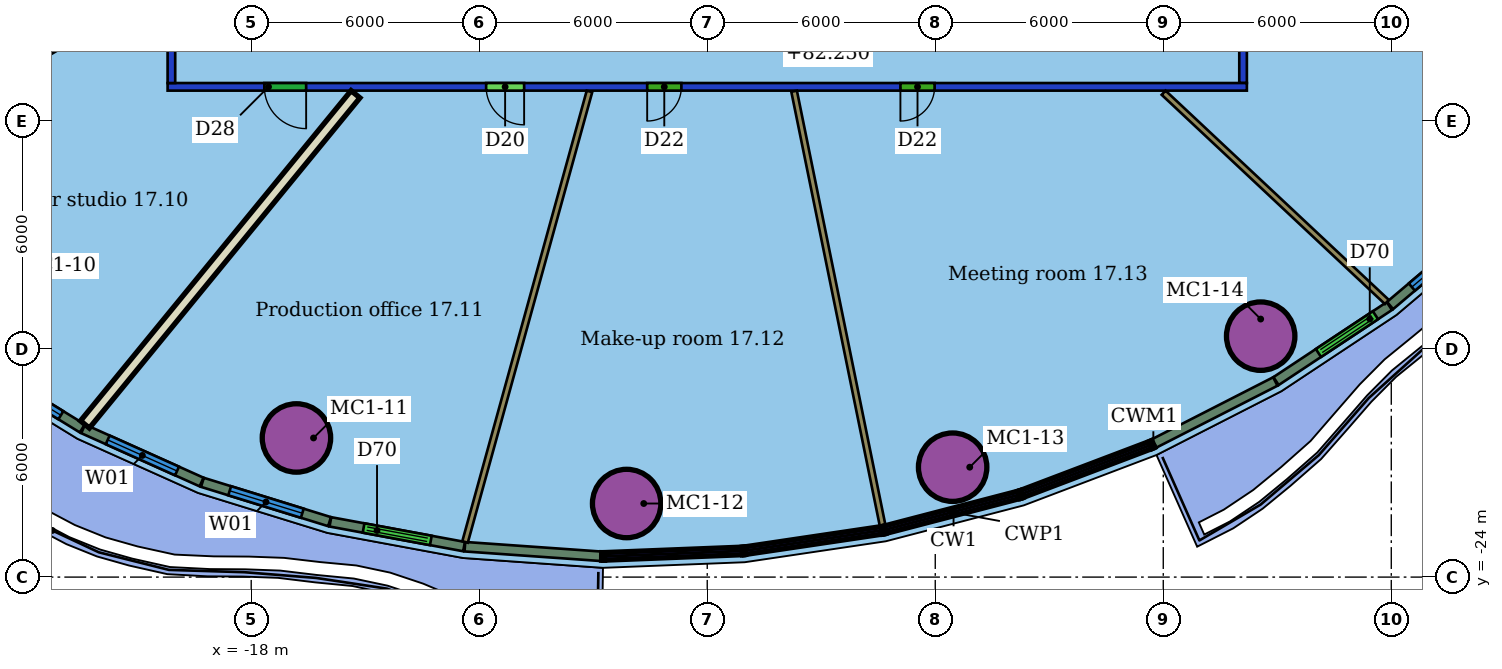
"""IFC4 building model, lengths in metres.
Left out: names, types, materials, properties, quantities, classifications, styles, units other than length and angle.
Written with IfcOpenShell. Run it as: python <this file> out.ifc"""

import sys

from ifc_helpers import new_model, si_unit, direction, frame, frame_2d, origin, origin_2d, place, context, subcontext, project, spatial, rectangle, hollow_circle, extrude, element, fill, save


model = new_model("IFC4")
c1 = context("Model", 3, precision=1e-05, world=origin(), true_north=direction((0.0, 1.0)))
c2 = subcontext(c1, "Body", "Model", "MODEL_VIEW")
j1 = project(units=[si_unit("LENGTHUNIT", "METRE"), si_unit("PLANEANGLEUNIT", "RADIAN")], contexts=[c1])
p1 = place(None, origin())
s1 = spatial("IfcSite", under=j1, at=p1, CompositionType="ELEMENT")
p2 = place(p1, origin())
s2 = spatial("IfcBuilding", under=s1, at=p2, CompositionType="ELEMENT")
p3 = place(p2, frame((0.0, 0.0, 80.4)))
s3 = spatial("IfcBuildingStorey", under=s2, at=p3, CompositionType="ELEMENT", Elevation=80.4)
for number, where, z_axis, x_axis in (
    (1, (-16.81, -20.339, 0.0), (0.0, 0.0, 1.0), (1.0, 0.0, 0.0)),
    (2, (-8.121, -22.064, 0.0), (0.0, 0.0, 1.0), (1.0, 0.0, 0.0)),
    (3, (0.458, -21.108, 0.0), (0.0, 0.0, 1.0), (1.0, 0.0, 0.0)),
    (4, (8.563, -17.66, 0.0), (0.0, 0.0, 1.0), (1.0, 0.0, 0.0)),
):
    element("IfcColumn", number, at=place(p3, frame(where, z_axis=z_axis, x_axis=x_axis)), inside=s3, PredefinedType="COLUMN", context=c2, shape_type="SweptSolid", body=[
        extrude(hollow_circle(Radius=0.9, WallThickness=0.06, at=origin_2d()), origin(), (0.0, 0.0, 1.0), 3.5),
    ])
p4 = place(p3, frame((8.2, -11.1, 0.0), z_axis=(0.0, 0.0, 1.0), x_axis=(-1.0, 0.0, 0.0)))
e5 = element("IfcWall", 5, at=p4, inside=s3, PredefinedType="PARTITIONING", context=c2, shape_type="SweptSolid", body=[
    extrude(rectangle(XDim=28.4, YDim=0.2, at=frame_2d((14.2, 0.0))), origin(), (0.0, 0.0, 1.0), 2.8),
])
p5 = place(p4, frame((24.754, 0.0, 0.0)))
e6 = element("IfcOpeningElement", 6, at=p5, cuts=e5, PredefinedType="OPENING", context=c2, shape_type="SweptSolid", body=[
    extrude(rectangle(XDim=1.1, YDim=2.1, at=frame_2d((0.55, 1.05))), frame((0.0, 0.11, 0.0), z_axis=(0.0, -1.0, 0.0), x_axis=(1.0, 0.0, 0.0)), (0.0, 0.0, 1.0), 0.22),
])
p6 = place(p4, frame((19.019, 0.0, 0.0)))
e7 = element("IfcOpeningElement", 7, at=p6, cuts=e5, PredefinedType="OPENING", context=c2, shape_type="SweptSolid", body=[
    extrude(rectangle(XDim=1.0, YDim=2.1, at=frame_2d((0.5, 1.05))), frame((0.0, 0.11, 0.0), z_axis=(0.0, -1.0, 0.0), x_axis=(1.0, 0.0, 0.0)), (0.0, 0.0, 1.0), 0.22),
])
p7 = place(p4, frame((14.88, 0.0, 0.0)))
e8 = element("IfcOpeningElement", 8, at=p7, cuts=e5, PredefinedType="OPENING", context=c2, shape_type="SweptSolid", body=[
    extrude(rectangle(XDim=0.9, YDim=2.1, at=frame_2d((0.45, 1.05))), frame((0.0, 0.11, 0.0), z_axis=(0.0, -1.0, 0.0), x_axis=(1.0, 0.0, 0.0)), (0.0, 0.0, 1.0), 0.22),
])
p8 = place(p4, frame((8.217, 0.0, 0.0)))
e9 = element("IfcOpeningElement", 9, at=p8, cuts=e5, PredefinedType="OPENING", context=c2, shape_type="SweptSolid", body=[
    extrude(rectangle(XDim=0.9, YDim=2.1, at=frame_2d((0.45, 1.05))), frame((0.0, 0.11, 0.0), z_axis=(0.0, -1.0, 0.0), x_axis=(1.0, 0.0, 0.0)), (0.0, 0.0, 1.0), 0.22),
])
p9 = place(p3, frame((-20.1, -11.0, 0.0), z_axis=(0.0, 0.0, 1.0), x_axis=(0.0, 1.0, 0.0)))
e10 = element("IfcWall", 10, at=p9, inside=s3, PredefinedType="PARTITIONING", context=c2, shape_type="SweptSolid", body=[
    extrude(rectangle(XDim=22.0, YDim=0.2, at=frame_2d((11.0, 0.0))), origin(), (0.0, 0.0, 1.0), 2.8),
])
p10 = place(p9, frame((18.0, 0.0, 0.0)))
e11 = element("IfcOpeningElement", 11, at=p10, cuts=e10, PredefinedType="OPENING", context=c2, shape_type="SweptSolid", body=[
    extrude(rectangle(XDim=0.9, YDim=2.1, at=frame_2d((0.45, 1.05))), frame((0.0, 0.11, 0.0), z_axis=(0.0, -1.0, 0.0), x_axis=(1.0, 0.0, 0.0)), (0.0, 0.0, 1.0), 0.22),
])
p11 = place(p9, frame((13.798, 0.0, 0.0)))
e12 = element("IfcOpeningElement", 12, at=p11, cuts=e10, PredefinedType="OPENING", context=c2, shape_type="SweptSolid", body=[
    extrude(rectangle(XDim=1.1, YDim=2.1, at=frame_2d((0.55, 1.05))), frame((0.0, 0.11, 0.0), z_axis=(0.0, -1.0, 0.0), x_axis=(1.0, 0.0, 0.0)), (0.0, 0.0, 1.0), 0.22),
])
p12 = place(p9, frame((8.872, 0.0, 0.0)))
e13 = element("IfcOpeningElement", 13, at=p12, cuts=e10, PredefinedType="OPENING", context=c2, shape_type="SweptSolid", body=[
    extrude(rectangle(XDim=1.2, YDim=2.1, at=frame_2d((0.6, 1.05))), frame((0.0, 0.11, 0.0), z_axis=(0.0, -1.0, 0.0), x_axis=(1.0, 0.0, 0.0)), (0.0, 0.0, 1.0), 0.22),
])
p13 = place(p9, frame((5.6, 0.0, 0.0)))
e14 = element("IfcOpeningElement", 14, at=p13, cuts=e10, PredefinedType="OPENING", context=c2, shape_type="SweptSolid", body=[
    extrude(rectangle(XDim=1.0, YDim=2.1, at=frame_2d((0.5, 1.05))), frame((0.0, 0.11, 0.0), z_axis=(0.0, -1.0, 0.0), x_axis=(1.0, 0.0, 0.0)), (0.0, 0.0, 1.0), 0.22),
])
p14 = place(p3, frame((8.1, 11.0, 0.0), z_axis=(0.0, 0.0, 1.0), x_axis=(0.0, -1.0, 0.0)))
e15 = element("IfcWall", 15, at=p14, inside=s3, PredefinedType="PARTITIONING", context=c2, shape_type="SweptSolid", body=[
    extrude(rectangle(XDim=22.0, YDim=0.2, at=frame_2d((11.0, 0.0))), origin(), (0.0, 0.0, 1.0), 2.8),
])
p15 = place(p14, frame((5.63, 0.0, 0.0)))
e16 = element("IfcOpeningElement", 16, at=p15, cuts=e15, PredefinedType="OPENING", context=c2, shape_type="SweptSolid", body=[
    extrude(rectangle(XDim=1.0, YDim=2.1, at=frame_2d((0.5, 1.05))), frame((0.0, 0.11, 0.0), z_axis=(0.0, -1.0, 0.0), x_axis=(1.0, 0.0, 0.0)), (0.0, 0.0, 1.0), 0.22),
])
p16 = place(p14, frame((16.523, 0.0, 0.0)))
e17 = element("IfcOpeningElement", 17, at=p16, cuts=e15, PredefinedType="OPENING", context=c2, shape_type="SweptSolid", body=[
    extrude(rectangle(XDim=1.5, YDim=2.1, at=frame_2d((0.75, 1.05))), frame((0.0, 0.11, 0.0), z_axis=(0.0, -1.0, 0.0), x_axis=(1.0, 0.0, 0.0)), (0.0, 0.0, 1.0), 0.22),
])
p17 = place(p14, frame((12.501, 0.0, 0.0)))
e18 = element("IfcOpeningElement", 18, at=p17, cuts=e15, PredefinedType="OPENING", context=c2, shape_type="SweptSolid", body=[
    extrude(rectangle(XDim=1.1, YDim=2.1, at=frame_2d((0.55, 1.05))), frame((0.0, 0.11, 0.0), z_axis=(0.0, -1.0, 0.0), x_axis=(1.0, 0.0, 0.0)), (0.0, 0.0, 1.0), 0.22),
])
p18 = place(p14, frame((8.782, 0.0, 0.0)))
e19 = element("IfcOpeningElement", 19, at=p18, cuts=e15, PredefinedType="OPENING", context=c2, shape_type="SweptSolid", body=[
    extrude(rectangle(XDim=1.5, YDim=2.1, at=frame_2d((0.75, 1.05))), frame((0.0, 0.11, 0.0), z_axis=(0.0, -1.0, 0.0), x_axis=(1.0, 0.0, 0.0)), (0.0, 0.0, 1.0), 0.22),
])
p19 = place(p3, frame((-29.864, -13.859, 0.0), z_axis=(0.0, 0.0, 1.0), x_axis=(0.864754710569, 0.502194474829, 0.0)))
e20 = element("IfcWall", 20, at=p19, inside=s3, PredefinedType="PARTITIONING", context=c2, shape_type="SweptSolid", body=[
    extrude(rectangle(XDim=11.089, YDim=0.3, at=frame_2d((5.544, 0.0))), origin(), (0.0, 0.0, 1.0), 3.5),
])
p20 = place(p3, frame((-22.375, -19.983, 0.0), z_axis=(0.0, 0.0, 1.0), x_axis=(0.633828209526, 0.773473852699, 0.0)))
e21 = element("IfcWall", 21, at=p20, inside=s3, PredefinedType="PARTITIONING", context=c2, shape_type="SweptSolid", body=[
    extrude(rectangle(XDim=11.233, YDim=0.3, at=frame_2d((5.616, 0.0))), origin(), (0.0, 0.0, 1.0), 3.5),
])
p21 = place(p3, frame((-12.373, -23.075, 0.0), z_axis=(0.0, 0.0, 1.0), x_axis=(0.266208224794, 0.963915546639, 0.0)))
e22 = element("IfcWall", 22, at=p21, inside=s3, PredefinedType="PARTITIONING", context=c2, shape_type="SweptSolid", body=[
    extrude(rectangle(XDim=12.299, YDim=0.15, at=frame_2d((6.15, 0.0))), origin(), (0.0, 0.0, 1.0), 3.5),
])
p22 = place(p3, frame((-1.385, -22.641, 0.0), z_axis=(0.0, 0.0, 1.0), x_axis=(-0.199694198183, 0.979858268941, 0.0)))
e23 = element("IfcWall", 23, at=p22, inside=s3, PredefinedType="PARTITIONING", context=c2, shape_type="SweptSolid", body=[
    extrude(rectangle(XDim=11.661, YDim=0.15, at=frame_2d((5.831, 0.0))), origin(), (0.0, 0.0, 1.0), 3.5),
])
p23 = place(p3, frame((11.884, -16.761, 0.0), z_axis=(0.0, 0.0, 1.0), x_axis=(-0.729643098054, 0.683828157846, 0.0)))
e24 = element("IfcWall", 24, at=p23, inside=s3, PredefinedType="PARTITIONING", context=c2, shape_type="SweptSolid", body=[
    extrude(rectangle(XDim=8.052, YDim=0.15, at=frame_2d((4.026, 0.0))), origin(), (0.0, 0.0, 1.0), 3.5),
])
p24 = place(p3, frame((-25.278, -18.348, 0.0), z_axis=(0.0, 0.0, 1.0), x_axis=(0.85230041537, -0.523052580492, 0.0)))
e25 = element("IfcWall", 25, at=p24, inside=s3, PredefinedType="SOLIDWALL", context=c2, shape_type="SweptSolid", body=[
    extrude(rectangle(XDim=3.326, YDim=0.25, at=frame_2d((1.663, 0.0))), origin(), (0.0, 0.0, 1.0), 3.1),
])
p25 = place(p24, frame((0.663, 0.0, 0.8)))
e26 = element("IfcOpeningElement", 26, at=p25, cuts=e25, PredefinedType="OPENING", context=c2, shape_type="SweptSolid", body=[
    extrude(rectangle(XDim=2.0, YDim=2.2, at=frame_2d((1.0, 1.1))), frame((0.0, 0.135, 0.0), z_axis=(0.0, -1.0, 0.0), x_axis=(1.0, 0.0, 0.0)), (0.0, 0.0, 1.0), 0.27),
])
p26 = place(p3, frame((-22.423, -20.099, 0.0), z_axis=(0.0, 0.0, 1.0), x_axis=(0.912234110734, -0.409669290055, 0.0)))
e27 = element("IfcWall", 27, at=p26, inside=s3, PredefinedType="SOLIDWALL", context=c2, shape_type="SweptSolid", body=[
    extrude(rectangle(XDim=3.417, YDim=0.25, at=frame_2d((1.708, 0.0))), origin(), (0.0, 0.0, 1.0), 3.1),
])
p27 = place(p26, frame((0.708, 0.0, 0.8)))
e28 = element("IfcOpeningElement", 28, at=p27, cuts=e27, PredefinedType="OPENING", context=c2, shape_type="SweptSolid", body=[
    extrude(rectangle(XDim=2.0, YDim=2.2, at=frame_2d((1.0, 1.1))), frame((0.0, 0.135, 0.0), z_axis=(0.0, -1.0, 0.0), x_axis=(1.0, 0.0, 0.0)), (0.0, 0.0, 1.0), 0.27),
])
p28 = place(p3, frame((-19.284, -21.507, 0.0), z_axis=(0.0, 0.0, 1.0), x_axis=(0.955359001532, -0.295447420351, 0.0)))
e29 = element("IfcWall", 29, at=p28, inside=s3, PredefinedType="SOLIDWALL", context=c2, shape_type="SweptSolid", body=[
    extrude(rectangle(XDim=3.502, YDim=0.25, at=frame_2d((1.751, 0.0))), origin(), (0.0, 0.0, 1.0), 3.1),
])
p29 = place(p28, frame((0.751, 0.0, 0.8)))
e30 = element("IfcOpeningElement", 30, at=p29, cuts=e29, PredefinedType="OPENING", context=c2, shape_type="SweptSolid", body=[
    extrude(rectangle(XDim=2.0, YDim=2.2, at=frame_2d((1.0, 1.1))), frame((0.0, 0.135, 0.0), z_axis=(0.0, -1.0, 0.0), x_axis=(1.0, 0.0, 0.0)), (0.0, 0.0, 1.0), 0.27),
])
p30 = place(p3, frame((-15.917, -22.547, 0.0), z_axis=(0.0, 0.0, 1.0), x_axis=(0.983303724205, -0.181971937299, 0.0)))
e31 = element("IfcWall", 31, at=p30, inside=s3, PredefinedType="SOLIDWALL", context=c2, shape_type="SweptSolid", body=[
    extrude(rectangle(XDim=3.577, YDim=0.25, at=frame_2d((1.789, 0.0))), origin(), (0.0, 0.0, 1.0), 3.1),
])
p31 = place(p30, frame((0.888, 0.0, 0.0)))
e32 = element("IfcOpeningElement", 32, at=p31, cuts=e31, PredefinedType="OPENING", context=c2, shape_type="SweptSolid", body=[
    extrude(rectangle(XDim=1.8, YDim=2.4, at=frame_2d((0.9, 1.2))), frame((0.0, 0.135, 0.0), z_axis=(0.0, -1.0, 0.0), x_axis=(1.0, 0.0, 0.0)), (0.0, 0.0, 1.0), 0.27),
])
p32 = place(p3, frame((-12.377, -23.2, 0.0), z_axis=(0.0, 0.0, 1.0), x_axis=(0.997533004905, -0.070199032227, 0.0)))
e33 = element("IfcWall", 33, at=p32, inside=s3, PredefinedType="SOLIDWALL", context=c2, shape_type="SweptSolid", body=[
    extrude(rectangle(XDim=3.593, YDim=0.25, at=frame_2d((1.796, 0.0))), origin(), (0.0, 0.0, 1.0), 3.1),
])
p33 = place(p3, frame((5.75, -20.488, 0.0), z_axis=(0.0, 0.0, 1.0), x_axis=(0.890478739506, 0.455024850407, 0.0)))
e34 = element("IfcWall", 34, at=p33, inside=s3, PredefinedType="SOLIDWALL", context=c2, shape_type="SweptSolid", body=[
    extrude(rectangle(XDim=3.593, YDim=0.25, at=frame_2d((1.796, 0.0))), origin(), (0.0, 0.0, 1.0), 3.1),
])
p34 = place(p3, frame((8.968, -18.843, 0.0), z_axis=(0.0, 0.0, 1.0), x_axis=(0.833653527953, 0.552287783073, 0.0)))
e35 = element("IfcWall", 35, at=p34, inside=s3, PredefinedType="SOLIDWALL", context=c2, shape_type="SweptSolid", body=[
    extrude(rectangle(XDim=3.577, YDim=0.25, at=frame_2d((1.788, 0.0))), origin(), (0.0, 0.0, 1.0), 3.1),
])
p35 = place(p34, frame((1.338, 0.0, 0.0)))
e36 = element("IfcOpeningElement", 36, at=p35, cuts=e35, PredefinedType="OPENING", context=c2, shape_type="SweptSolid", body=[
    extrude(rectangle(XDim=1.8, YDim=2.4, at=frame_2d((0.9, 1.2))), frame((0.0, 0.135, 0.0), z_axis=(0.0, -1.0, 0.0), x_axis=(1.0, 0.0, 0.0)), (0.0, 0.0, 1.0), 0.27),
])
p36 = place(p3, frame((11.968, -16.854, 0.0), z_axis=(0.0, 0.0, 1.0), x_axis=(0.76352642001, 0.645776591358, 0.0)))
e37 = element("IfcWall", 37, at=p36, inside=s3, PredefinedType="SOLIDWALL", context=c2, shape_type="SweptSolid", body=[
    extrude(rectangle(XDim=3.502, YDim=0.25, at=frame_2d((1.751, 0.0))), origin(), (0.0, 0.0, 1.0), 3.1),
])
p37 = place(p36, frame((0.751, 0.0, 0.8)))
e38 = element("IfcOpeningElement", 38, at=p37, cuts=e37, PredefinedType="OPENING", context=c2, shape_type="SweptSolid", body=[
    extrude(rectangle(XDim=2.0, YDim=2.2, at=frame_2d((1.0, 1.1))), frame((0.0, 0.135, 0.0), z_axis=(0.0, -1.0, 0.0), x_axis=(1.0, 0.0, 0.0)), (0.0, 0.0, 1.0), 0.27),
])
p38 = place(p5, origin())
e39 = element("IfcDoor", 39, at=p38, inside=s3, OperationType="SINGLE_SWING_LEFT", PredefinedType="DOOR", context=c2, shape_type="SweptSolid", body=[
    extrude(rectangle(XDim=1.1, YDim=2.1, at=frame_2d((0.55, 1.05))), frame((0.0, 0.025, 0.0), z_axis=(0.0, -1.0, 0.0), x_axis=(1.0, 0.0, 0.0)), (0.0, 0.0, 1.0), 0.05),
])
fill(e6, e39)
p39 = place(p6, origin())
e40 = element("IfcDoor", 40, at=p39, inside=s3, OperationType="SINGLE_SWING_LEFT", PredefinedType="DOOR", context=c2, shape_type="SweptSolid", body=[
    extrude(rectangle(XDim=1.0, YDim=2.1, at=frame_2d((0.5, 1.05))), frame((0.0, 0.025, 0.0), z_axis=(0.0, -1.0, 0.0), x_axis=(1.0, 0.0, 0.0)), (0.0, 0.0, 1.0), 0.05),
])
fill(e7, e40)
p40 = place(p7, origin())
e41 = element("IfcDoor", 41, at=p40, inside=s3, OperationType="SINGLE_SWING_RIGHT", PredefinedType="DOOR", context=c2, shape_type="SweptSolid", body=[
    extrude(rectangle(XDim=0.9, YDim=2.1, at=frame_2d((0.45, 1.05))), frame((0.0, 0.025, 0.0), z_axis=(0.0, -1.0, 0.0), x_axis=(1.0, 0.0, 0.0)), (0.0, 0.0, 1.0), 0.05),
])
fill(e8, e41)
p41 = place(p8, origin())
e42 = element("IfcDoor", 42, at=p41, inside=s3, OperationType="SINGLE_SWING_RIGHT", PredefinedType="DOOR", context=c2, shape_type="SweptSolid", body=[
    extrude(rectangle(XDim=0.9, YDim=2.1, at=frame_2d((0.45, 1.05))), frame((0.0, 0.025, 0.0), z_axis=(0.0, -1.0, 0.0), x_axis=(1.0, 0.0, 0.0)), (0.0, 0.0, 1.0), 0.05),
])
fill(e9, e42)
p42 = place(p25, origin())
e43 = element("IfcWindow", 43, at=p42, inside=s3, PartitioningType="SINGLE_PANEL", PredefinedType="WINDOW", context=c2, shape_type="SweptSolid", body=[
    extrude(rectangle(XDim=2.0, YDim=2.2, at=frame_2d((1.0, 1.1))), frame((0.0, 0.03, 0.0), z_axis=(0.0, -1.0, 0.0), x_axis=(1.0, 0.0, 0.0)), (0.0, 0.0, 1.0), 0.06),
])
fill(e26, e43)
p43 = place(p27, origin())
e44 = element("IfcWindow", 44, at=p43, inside=s3, PartitioningType="SINGLE_PANEL", PredefinedType="WINDOW", context=c2, shape_type="SweptSolid", body=[
    extrude(rectangle(XDim=2.0, YDim=2.2, at=frame_2d((1.0, 1.1))), frame((0.0, 0.03, 0.0), z_axis=(0.0, -1.0, 0.0), x_axis=(1.0, 0.0, 0.0)), (0.0, 0.0, 1.0), 0.06),
])
fill(e28, e44)
p44 = place(p29, origin())
e45 = element("IfcWindow", 45, at=p44, inside=s3, PartitioningType="SINGLE_PANEL", PredefinedType="WINDOW", context=c2, shape_type="SweptSolid", body=[
    extrude(rectangle(XDim=2.0, YDim=2.2, at=frame_2d((1.0, 1.1))), frame((0.0, 0.03, 0.0), z_axis=(0.0, -1.0, 0.0), x_axis=(1.0, 0.0, 0.0)), (0.0, 0.0, 1.0), 0.06),
])
fill(e30, e45)
p45 = place(p31, origin())
e46 = element("IfcDoor", 46, at=p45, inside=s3, OperationType="DOUBLE_DOOR_SLIDING", PredefinedType="DOOR", context=c2, shape_type="SweptSolid", body=[
    extrude(rectangle(XDim=1.8, YDim=2.4, at=frame_2d((0.9, 1.2))), frame((0.0, 0.025, 0.0), z_axis=(0.0, -1.0, 0.0), x_axis=(1.0, 0.0, 0.0)), (0.0, 0.0, 1.0), 0.05),
])
fill(e32, e46)
p46 = place(p35, origin())
e47 = element("IfcDoor", 47, at=p46, inside=s3, OperationType="DOUBLE_DOOR_SLIDING", PredefinedType="DOOR", context=c2, shape_type="SweptSolid", body=[
    extrude(rectangle(XDim=1.8, YDim=2.4, at=frame_2d((0.9, 1.2))), frame((0.0, 0.025, 0.0), z_axis=(0.0, -1.0, 0.0), x_axis=(1.0, 0.0, 0.0)), (0.0, 0.0, 1.0), 0.05),
])
fill(e36, e47)
p47 = place(p37, origin())
e48 = element("IfcWindow", 48, at=p47, inside=s3, PartitioningType="SINGLE_PANEL", PredefinedType="WINDOW", context=c2, shape_type="SweptSolid", body=[
    extrude(rectangle(XDim=2.0, YDim=2.2, at=frame_2d((1.0, 1.1))), frame((0.0, 0.03, 0.0), z_axis=(0.0, -1.0, 0.0), x_axis=(1.0, 0.0, 0.0)), (0.0, 0.0, 1.0), 0.06),
])
fill(e38, e48)
save(model, sys.argv[1])
